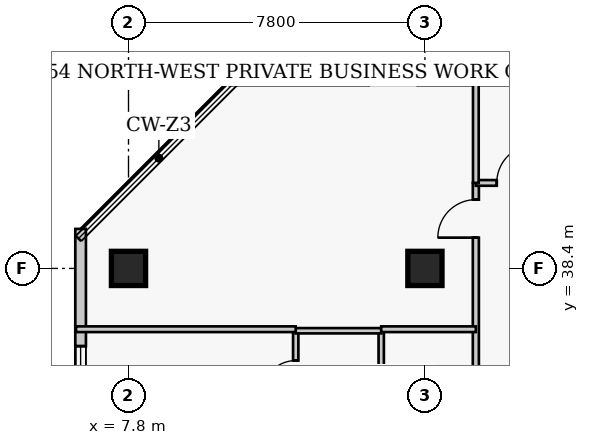
"""IFC4 building model, lengths in metres.
Left out: names, types, materials, properties, quantities, classifications, styles, units other than length and angle.
Written with IfcOpenShell. Run it as: python <this file> out.ifc"""

import sys

from ifc_helpers import new_model, si_unit, direction, frame, frame_2d, origin, origin_2d, place, context, subcontext, project, spatial, rectangle, extrude, element, fill, save


model = new_model("IFC4")
c1 = context("Model", 3, precision=1e-05, world=origin(), true_north=direction((0.0, 1.0)))
c2 = subcontext(c1, "Body", "Model", "MODEL_VIEW")
j1 = project(units=[si_unit("LENGTHUNIT", "METRE"), si_unit("PLANEANGLEUNIT", "RADIAN")], contexts=[c1])
p1 = place(None, origin())
s1 = spatial("IfcSite", under=j1, at=p1, CompositionType="ELEMENT")
p2 = place(p1, origin())
s2 = spatial("IfcBuilding", under=s1, at=p2, CompositionType="ELEMENT")
p3 = place(p2, frame((0.0, 0.0, 216.3)))
s3 = spatial("IfcBuildingStorey", under=s2, at=p3, CompositionType="ELEMENT", Elevation=216.3)
for number, where, z_axis, x_axis in (
    (1, (7.8, 38.4, 0.0), (0.0, 0.0, 1.0), (1.0, 0.0, 0.0)),
    (2, (15.6, 38.4, 0.0), (0.0, 0.0, 1.0), (1.0, 0.0, 0.0)),
):
    element("IfcColumn", number, at=place(p3, frame(where, z_axis=z_axis, x_axis=x_axis)), inside=s3, PredefinedType="COLUMN", context=c2, shape_type="SweptSolid", body=[
        extrude(rectangle(XDim=0.9, YDim=0.9, at=origin_2d()), origin(), (0.0, 0.0, 1.0), 3.9),
    ])
p4 = place(p3, frame((36.29, 43.36, 0.0), z_axis=(0.0, 0.0, 1.0), x_axis=(-1.0, 0.0, 0.0)))
e3 = element("IfcWall", 3, at=p4, inside=s3, PredefinedType="SOLIDWALL", context=c2, shape_type="SweptSolid", body=[
    extrude(rectangle(XDim=25.83, YDim=0.28, at=frame_2d((12.915, 0.0))), origin(), (0.0, 0.0, 1.0), 3.65),
])
p5 = place(p4, frame((7.29, 0.0, 0.0)))
e4 = element("IfcOpeningElement", 4, at=p5, cuts=e3, PredefinedType="OPENING", context=c2, shape_type="SweptSolid", body=[
    extrude(rectangle(XDim=1.4, YDim=2.15, at=frame_2d((0.7, 1.075))), frame((0.0, 0.15, 0.0), z_axis=(0.0, -1.0, 0.0), x_axis=(1.0, 0.0, 0.0)), (0.0, 0.0, 1.0), 0.3),
])
p6 = place(p4, frame((3.005, 0.0, 0.85)))
e5 = element("IfcOpeningElement", 5, at=p6, cuts=e3, PredefinedType="OPENING", context=c2, shape_type="SweptSolid", body=[
    extrude(rectangle(XDim=1.3, YDim=1.7, at=frame_2d((0.65, 0.85))), frame((0.0, 0.15, 0.0), z_axis=(0.0, -1.0, 0.0), x_axis=(1.0, 0.0, 0.0)), (0.0, 0.0, 1.0), 0.3),
])
p7 = place(p4, frame((12.265, 0.0, 0.85)))
e6 = element("IfcOpeningElement", 6, at=p7, cuts=e3, PredefinedType="OPENING", context=c2, shape_type="SweptSolid", body=[
    extrude(rectangle(XDim=1.3, YDim=1.7, at=frame_2d((0.65, 0.85))), frame((0.0, 0.15, 0.0), z_axis=(0.0, -1.0, 0.0), x_axis=(1.0, 0.0, 0.0)), (0.0, 0.0, 1.0), 0.3),
])
p8 = place(p4, frame((20.875, 0.0, 0.85)))
e7 = element("IfcOpeningElement", 7, at=p8, cuts=e3, PredefinedType="OPENING", context=c2, shape_type="SweptSolid", body=[
    extrude(rectangle(XDim=1.3, YDim=1.7, at=frame_2d((0.65, 0.85))), frame((0.0, 0.15, 0.0), z_axis=(0.0, -1.0, 0.0), x_axis=(1.0, 0.0, 0.0)), (0.0, 0.0, 1.0), 0.3),
])
p9 = place(p3, frame((6.54, 39.44, 0.0), z_axis=(0.0, 0.0, 1.0), x_axis=(0.0, -1.0, 0.0)))
e8 = element("IfcWall", 8, at=p9, inside=s3, PredefinedType="SOLIDWALL", context=c2, shape_type="SweptSolid", body=[
    extrude(rectangle(XDim=29.88, YDim=0.28, at=frame_2d((14.94, 0.0))), origin(), (0.0, 0.0, 1.0), 3.65),
])
p10 = place(p9, frame((3.085, 0.0, 0.85)))
e9 = element("IfcOpeningElement", 9, at=p10, cuts=e8, PredefinedType="OPENING", context=c2, shape_type="SweptSolid", body=[
    extrude(rectangle(XDim=1.3, YDim=1.7, at=frame_2d((0.65, 0.85))), frame((0.0, 0.15, 0.0), z_axis=(0.0, -1.0, 0.0), x_axis=(1.0, 0.0, 0.0)), (0.0, 0.0, 1.0), 0.3),
])
p11 = place(p9, frame((11.205, 0.0, 0.85)))
e10 = element("IfcOpeningElement", 10, at=p11, cuts=e8, PredefinedType="OPENING", context=c2, shape_type="SweptSolid", body=[
    extrude(rectangle(XDim=1.3, YDim=1.7, at=frame_2d((0.65, 0.85))), frame((0.0, 0.15, 0.0), z_axis=(0.0, -1.0, 0.0), x_axis=(1.0, 0.0, 0.0)), (0.0, 0.0, 1.0), 0.3),
])
p12 = place(p9, frame((17.375, 0.0, 0.85)))
e11 = element("IfcOpeningElement", 11, at=p12, cuts=e8, PredefinedType="OPENING", context=c2, shape_type="SweptSolid", body=[
    extrude(rectangle(XDim=1.3, YDim=1.7, at=frame_2d((0.65, 0.85))), frame((0.0, 0.15, 0.0), z_axis=(0.0, -1.0, 0.0), x_axis=(1.0, 0.0, 0.0)), (0.0, 0.0, 1.0), 0.3),
])
p13 = place(p9, frame((25.495, 0.0, 0.85)))
e12 = element("IfcOpeningElement", 12, at=p13, cuts=e8, PredefinedType="OPENING", context=c2, shape_type="SweptSolid", body=[
    extrude(rectangle(XDim=1.3, YDim=1.7, at=frame_2d((0.65, 0.85))), frame((0.0, 0.15, 0.0), z_axis=(0.0, -1.0, 0.0), x_axis=(1.0, 0.0, 0.0)), (0.0, 0.0, 1.0), 0.3),
])
p14 = place(p3, frame((16.94, 7.55, 0.0), z_axis=(0.0, 0.0, 1.0), x_axis=(0.0, 1.0, 0.0)))
e13 = element("IfcWall", 13, at=p14, inside=s3, PredefinedType="PARTITIONING", context=c2, shape_type="SweptSolid", body=[
    extrude(rectangle(XDim=33.1, YDim=0.16, at=frame_2d((16.55, 0.0))), origin(), (0.0, 0.0, 1.0), 3.65),
])
p15 = place(p14, frame((0.46, 0.0, 0.0)))
e14 = element("IfcOpeningElement", 14, at=p15, cuts=e13, PredefinedType="OPENING", context=c2, shape_type="SweptSolid", body=[
    extrude(rectangle(XDim=0.95, YDim=2.1, at=frame_2d((0.475, 1.05))), frame((0.0, 0.09, 0.0), z_axis=(0.0, -1.0, 0.0), x_axis=(1.0, 0.0, 0.0)), (0.0, 0.0, 1.0), 0.18),
])
p16 = place(p14, frame((7.575, 0.0, 0.0)))
e15 = element("IfcOpeningElement", 15, at=p16, cuts=e13, PredefinedType="OPENING", context=c2, shape_type="SweptSolid", body=[
    extrude(rectangle(XDim=0.95, YDim=2.1, at=frame_2d((0.475, 1.05))), frame((0.0, 0.09, 0.0), z_axis=(0.0, -1.0, 0.0), x_axis=(1.0, 0.0, 0.0)), (0.0, 0.0, 1.0), 0.18),
])
p17 = place(p14, frame((16.375, 0.0, 0.0)))
e16 = element("IfcOpeningElement", 16, at=p17, cuts=e13, PredefinedType="OPENING", context=c2, shape_type="SweptSolid", body=[
    extrude(rectangle(XDim=0.95, YDim=2.1, at=frame_2d((0.475, 1.05))), frame((0.0, 0.09, 0.0), z_axis=(0.0, -1.0, 0.0), x_axis=(1.0, 0.0, 0.0)), (0.0, 0.0, 1.0), 0.18),
])
p18 = place(p14, frame((24.775, 0.0, 0.0)))
e17 = element("IfcOpeningElement", 17, at=p18, cuts=e13, PredefinedType="OPENING", context=c2, shape_type="SweptSolid", body=[
    extrude(rectangle(XDim=0.95, YDim=2.1, at=frame_2d((0.475, 1.05))), frame((0.0, 0.09, 0.0), z_axis=(0.0, -1.0, 0.0), x_axis=(1.0, 0.0, 0.0)), (0.0, 0.0, 1.0), 0.18),
])
p19 = place(p14, frame((31.66, 0.0, 0.0)))
e18 = element("IfcOpeningElement", 18, at=p19, cuts=e13, PredefinedType="OPENING", context=c2, shape_type="SweptSolid", body=[
    extrude(rectangle(XDim=1.0, YDim=2.15, at=frame_2d((0.5, 1.075))), frame((0.0, 0.09, 0.0), z_axis=(0.0, -1.0, 0.0), x_axis=(1.0, 0.0, 0.0)), (0.0, 0.0, 1.0), 0.18),
])
p20 = place(p3, frame((16.94, 40.65, 0.0), z_axis=(0.0, 0.0, 1.0), x_axis=(1.0, 0.0, 0.0)))
e19 = element("IfcWall", 19, at=p20, inside=s3, PredefinedType="PARTITIONING", context=c2, shape_type="SweptSolid", body=[
    extrude(rectangle(XDim=5.16, YDim=0.15, at=frame_2d((2.58, 0.0))), origin(), (0.0, 0.0, 1.0), 3.65),
])
p21 = place(p20, frame((0.55, 0.0, 0.0)))
e20 = element("IfcOpeningElement", 20, at=p21, cuts=e19, PredefinedType="OPENING", context=c2, shape_type="SweptSolid", body=[
    extrude(rectangle(XDim=1.0, YDim=2.15, at=frame_2d((0.5, 1.075))), frame((0.0, 0.085, 0.0), z_axis=(0.0, -1.0, 0.0), x_axis=(1.0, 0.0, 0.0)), (0.0, 0.0, 1.0), 0.17),
])
p22 = place(p3, frame((16.94, 40.65, 0.0), z_axis=(0.0, 0.0, 1.0), x_axis=(0.0, 1.0, 0.0)))
e21 = element("IfcWall", 21, at=p22, inside=s3, PredefinedType="PARTITIONING", context=c2, shape_type="SweptSolid", body=[
    extrude(rectangle(XDim=2.83, YDim=0.15, at=frame_2d((1.415, 0.0))), origin(), (0.0, 0.0, 1.0), 3.65),
])
p23 = place(p3, frame((12.2, 34.31, 0.0), z_axis=(0.0, 0.0, 1.0), x_axis=(0.0, 1.0, 0.0)))
e22 = element("IfcWall", 22, at=p23, inside=s3, PredefinedType="PLUMBINGWALL", context=c2, shape_type="SweptSolid", body=[
    extrude(rectangle(XDim=2.45, YDim=0.14, at=frame_2d((1.225, 0.0))), origin(), (0.0, 0.0, 1.0), 3.65),
])
p24 = place(p23, frame((0.785, 0.0, 0.0)))
e23 = element("IfcOpeningElement", 23, at=p24, cuts=e22, PredefinedType="OPENING", context=c2, shape_type="SweptSolid", body=[
    extrude(rectangle(XDim=0.88, YDim=2.05, at=frame_2d((0.44, 1.025))), frame((0.0, 0.08, 0.0), z_axis=(0.0, -1.0, 0.0), x_axis=(1.0, 0.0, 0.0)), (0.0, 0.0, 1.0), 0.16),
])
p25 = place(p3, frame((14.45, 34.31, 0.0), z_axis=(0.0, 0.0, 1.0), x_axis=(0.0, 1.0, 0.0)))
e24 = element("IfcWall", 24, at=p25, inside=s3, PredefinedType="PLUMBINGWALL", context=c2, shape_type="SweptSolid", body=[
    extrude(rectangle(XDim=2.45, YDim=0.14, at=frame_2d((1.225, 0.0))), origin(), (0.0, 0.0, 1.0), 3.65),
])
p26 = place(p3, frame((12.2, 36.76, 0.0), z_axis=(0.0, 0.0, 1.0), x_axis=(1.0, 0.0, 0.0)))
e25 = element("IfcWall", 25, at=p26, inside=s3, PredefinedType="PLUMBINGWALL", context=c2, shape_type="SweptSolid", body=[
    extrude(rectangle(XDim=2.25, YDim=0.14, at=frame_2d((1.125, 0.0))), origin(), (0.0, 0.0, 1.0), 3.65),
])
p27 = place(p3, frame((6.42, 36.8, 0.0), z_axis=(0.0, 0.0, 1.0), x_axis=(1.0, 0.0, 0.0)))
e26 = element("IfcWall", 26, at=p27, inside=s3, PredefinedType="PARTITIONING", context=c2, shape_type="SweptSolid", body=[
    extrude(rectangle(XDim=5.78, YDim=0.15, at=frame_2d((2.89, 0.0))), origin(), (0.0, 0.0, 1.0), 3.65),
])
p28 = place(p3, frame((14.45, 36.8, 0.0), z_axis=(0.0, 0.0, 1.0), x_axis=(1.0, 0.0, 0.0)))
e27 = element("IfcWall", 27, at=p28, inside=s3, PredefinedType="PARTITIONING", context=c2, shape_type="SweptSolid", body=[
    extrude(rectangle(XDim=2.49, YDim=0.15, at=frame_2d((1.245, 0.0))), origin(), (0.0, 0.0, 1.0), 3.65),
])
p29 = place(p8, origin())
e28 = element("IfcWindow", 28, at=p29, inside=s3, PartitioningType="SINGLE_PANEL", PredefinedType="WINDOW", context=c2, shape_type="SweptSolid", body=[
    extrude(rectangle(XDim=1.3, YDim=1.7, at=frame_2d((0.65, 0.85))), frame((0.0, 0.03, 0.0), z_axis=(0.0, -1.0, 0.0), x_axis=(1.0, 0.0, 0.0)), (0.0, 0.0, 1.0), 0.06),
])
fill(e7, e28)
p30 = place(p10, origin())
e29 = element("IfcWindow", 29, at=p30, inside=s3, PartitioningType="SINGLE_PANEL", PredefinedType="WINDOW", context=c2, shape_type="SweptSolid", body=[
    extrude(rectangle(XDim=1.3, YDim=1.7, at=frame_2d((0.65, 0.85))), frame((0.0, 0.03, 0.0), z_axis=(0.0, -1.0, 0.0), x_axis=(1.0, 0.0, 0.0)), (0.0, 0.0, 1.0), 0.06),
])
fill(e9, e29)
p31 = place(p21, origin())
e30 = element("IfcDoor", 30, at=p31, inside=s3, OperationType="SINGLE_SWING_RIGHT", PredefinedType="DOOR", context=c2, shape_type="SweptSolid", body=[
    extrude(rectangle(XDim=1.0, YDim=2.15, at=frame_2d((0.5, 1.075))), frame((0.0, 0.025, 0.0), z_axis=(0.0, -1.0, 0.0), x_axis=(1.0, 0.0, 0.0)), (0.0, 0.0, 1.0), 0.05),
])
fill(e20, e30)
p32 = place(p24, origin())
e31 = element("IfcDoor", 31, at=p32, inside=s3, OperationType="SINGLE_SWING_LEFT", PredefinedType="DOOR", context=c2, shape_type="SweptSolid", body=[
    extrude(rectangle(XDim=0.88, YDim=2.05, at=frame_2d((0.44, 1.025))), frame((0.0, 0.025, 0.0), z_axis=(0.0, -1.0, 0.0), x_axis=(1.0, 0.0, 0.0)), (0.0, 0.0, 1.0), 0.05),
])
fill(e23, e31)
p33 = place(p19, origin())
e32 = element("IfcDoor", 32, at=p33, inside=s3, OperationType="SINGLE_SWING_LEFT", PredefinedType="DOOR", context=c2, shape_type="SweptSolid", body=[
    extrude(rectangle(XDim=1.0, YDim=2.15, at=frame_2d((0.5, 1.075))), frame((0.0, 0.025, 0.0), z_axis=(0.0, -1.0, 0.0), x_axis=(1.0, 0.0, 0.0)), (0.0, 0.0, 1.0), 0.05),
])
fill(e18, e32)
save(model, sys.argv[1])
